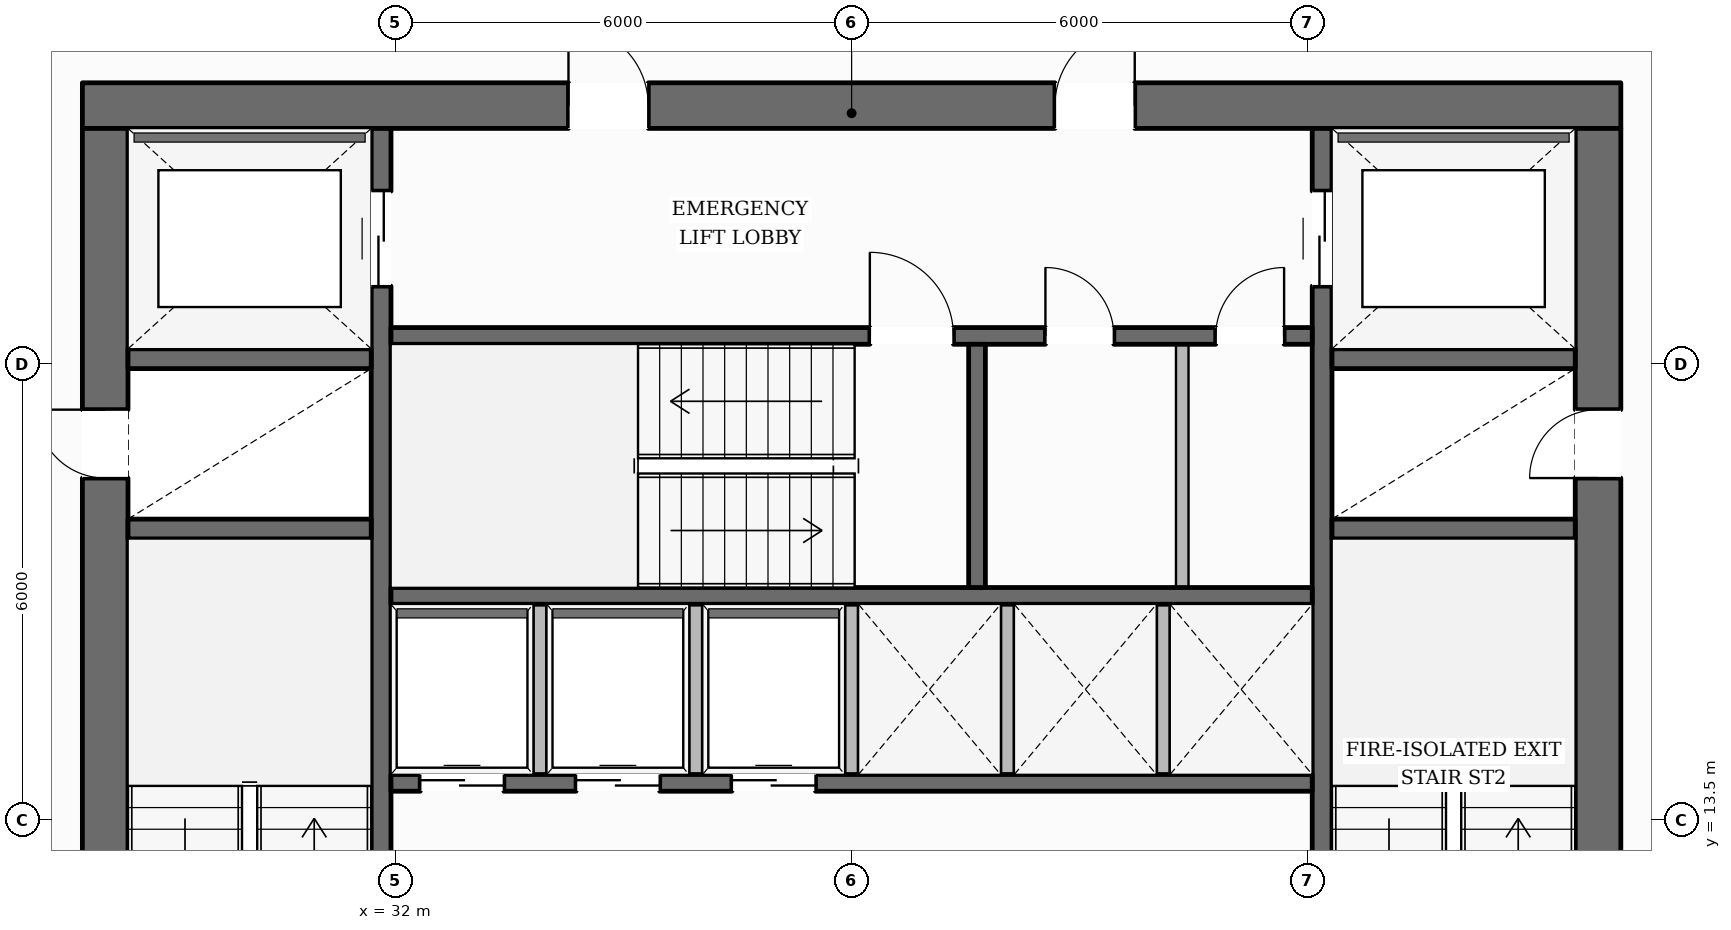
"""IFC4 building model, lengths in metres.
Left out: names, types, materials, properties, quantities, classifications, styles, units other than length and angle.
Written with IfcOpenShell. Run it as: python <this file> out.ifc"""

import sys

from ifc_helpers import new_model, si_unit, direction, frame, frame_2d, origin, place, context, subcontext, project, spatial, rectangle, extrude, element, fill, save


model = new_model("IFC4")
c1 = context("Model", 3, precision=1e-05, world=origin(), true_north=direction((0.0, 1.0)))
c2 = subcontext(c1, "Body", "Model", "MODEL_VIEW")
j1 = project(units=[si_unit("LENGTHUNIT", "METRE"), si_unit("PLANEANGLEUNIT", "RADIAN")], contexts=[c1])
p1 = place(None, origin())
s1 = spatial("IfcSite", under=j1, at=p1, CompositionType="ELEMENT")
p2 = place(p1, origin())
s2 = spatial("IfcBuilding", under=s1, at=p2, CompositionType="ELEMENT")
p3 = place(p2, frame((0.0, 0.0, 32.95)))
s3 = spatial("IfcBuildingStorey", under=s2, at=p3, CompositionType="ELEMENT", Elevation=32.95)
p4 = place(p3, frame((27.88, 22.9, 0.0), z_axis=(0.0, 0.0, 1.0), x_axis=(1.0, 0.0, 0.0)))
e1 = element("IfcWall", 1, at=p4, inside=s3, PredefinedType="SOLIDWALL", context=c2, shape_type="SweptSolid", body=[
    extrude(rectangle(XDim=20.24, YDim=0.6, at=frame_2d((10.12, 0.0))), origin(), (0.0, 0.0, 1.0), 3.59),
])
p5 = place(p4, frame((6.395, 0.0, 0.0)))
e2 = element("IfcOpeningElement", 2, at=p5, cuts=e1, PredefinedType="OPENING", context=c2, shape_type="SweptSolid", body=[
    extrude(rectangle(XDim=1.05, YDim=2.15, at=frame_2d((0.525, 1.075))), frame((0.0, 0.31, 0.0), z_axis=(0.0, -1.0, 0.0), x_axis=(1.0, 0.0, 0.0)), (0.0, 0.0, 1.0), 0.62),
])
p6 = place(p4, frame((12.795, 0.0, 0.0)))
e3 = element("IfcOpeningElement", 3, at=p6, cuts=e1, PredefinedType="OPENING", context=c2, shape_type="SweptSolid", body=[
    extrude(rectangle(XDim=1.05, YDim=2.15, at=frame_2d((0.525, 1.075))), frame((0.0, 0.31, 0.0), z_axis=(0.0, -1.0, 0.0), x_axis=(1.0, 0.0, 0.0)), (0.0, 0.0, 1.0), 0.62),
])
p7 = place(p3, frame((28.18, 9.6, 0.0), z_axis=(0.0, 0.0, 1.0), x_axis=(0.0, 1.0, 0.0)))
e4 = element("IfcWall", 4, at=p7, inside=s3, PredefinedType="SOLIDWALL", context=c2, shape_type="SweptSolid", body=[
    extrude(rectangle(XDim=13.0, YDim=0.6, at=frame_2d((6.5, 0.0))), origin(), (0.0, 0.0, 1.0), 3.59),
])
p8 = place(p7, frame((0.2, 0.0, 0.0)))
e5 = element("IfcOpeningElement", 5, at=p8, cuts=e4, PredefinedType="OPENING", context=c2, shape_type="SweptSolid", body=[
    extrude(rectangle(XDim=1.1, YDim=2.15, at=frame_2d((0.55, 1.075))), frame((0.0, 0.31, 0.0), z_axis=(0.0, -1.0, 0.0), x_axis=(1.0, 0.0, 0.0)), (0.0, 0.0, 1.0), 0.62),
])
p9 = place(p7, frame((8.4, 0.0, 0.0)))
e6 = element("IfcOpeningElement", 6, at=p9, cuts=e4, PredefinedType="OPENING", context=c2, shape_type="SweptSolid", body=[
    extrude(rectangle(XDim=0.9, YDim=2.1, at=frame_2d((0.45, 1.05))), frame((0.0, 0.31, 0.0), z_axis=(0.0, -1.0, 0.0), x_axis=(1.0, 0.0, 0.0)), (0.0, 0.0, 1.0), 0.62),
])
p10 = place(p3, frame((47.82, 9.6, 0.0), z_axis=(0.0, 0.0, 1.0), x_axis=(0.0, 1.0, 0.0)))
e7 = element("IfcWall", 7, at=p10, inside=s3, PredefinedType="SOLIDWALL", context=c2, shape_type="SweptSolid", body=[
    extrude(rectangle(XDim=13.0, YDim=0.6, at=frame_2d((6.5, 0.0))), origin(), (0.0, 0.0, 1.0), 3.59),
])
p11 = place(p10, frame((0.2, 0.0, 0.0)))
e8 = element("IfcOpeningElement", 8, at=p11, cuts=e7, PredefinedType="OPENING", context=c2, shape_type="SweptSolid", body=[
    extrude(rectangle(XDim=1.1, YDim=2.15, at=frame_2d((0.55, 1.075))), frame((0.0, 0.31, 0.0), z_axis=(0.0, -1.0, 0.0), x_axis=(1.0, 0.0, 0.0)), (0.0, 0.0, 1.0), 0.62),
])
p12 = place(p10, frame((8.4, 0.0, 0.0)))
e9 = element("IfcOpeningElement", 9, at=p12, cuts=e7, PredefinedType="OPENING", context=c2, shape_type="SweptSolid", body=[
    extrude(rectangle(XDim=0.9, YDim=2.1, at=frame_2d((0.45, 1.05))), frame((0.0, 0.31, 0.0), z_axis=(0.0, -1.0, 0.0), x_axis=(1.0, 0.0, 0.0)), (0.0, 0.0, 1.0), 0.62),
])
p13 = place(p3, frame((31.81, 9.6, 0.0), z_axis=(0.0, 0.0, 1.0), x_axis=(0.0, 1.0, 0.0)))
e10 = element("IfcWall", 10, at=p13, inside=s3, PredefinedType="SHEAR", context=c2, shape_type="SweptSolid", body=[
    extrude(rectangle(XDim=13.0, YDim=0.26, at=frame_2d((6.5, 0.0))), origin(), (0.0, 0.0, 1.0), 3.59),
])
p14 = place(p13, frame((10.925, 0.0, 0.0)))
e11 = element("IfcOpeningElement", 11, at=p14, cuts=e10, PredefinedType="OPENING", context=c2, shape_type="SweptSolid", body=[
    extrude(rectangle(XDim=1.25, YDim=2.25, at=frame_2d((0.625, 1.125))), frame((0.0, 0.14, 0.0), z_axis=(0.0, -1.0, 0.0), x_axis=(1.0, 0.0, 0.0)), (0.0, 0.0, 1.0), 0.28),
])
p15 = place(p3, frame((44.19, 9.6, 0.0), z_axis=(0.0, 0.0, 1.0), x_axis=(0.0, 1.0, 0.0)))
e12 = element("IfcWall", 12, at=p15, inside=s3, PredefinedType="SHEAR", context=c2, shape_type="SweptSolid", body=[
    extrude(rectangle(XDim=13.0, YDim=0.26, at=frame_2d((6.5, 0.0))), origin(), (0.0, 0.0, 1.0), 3.59),
])
p16 = place(p15, frame((10.925, 0.0, 0.0)))
e13 = element("IfcOpeningElement", 13, at=p16, cuts=e12, PredefinedType="OPENING", context=c2, shape_type="SweptSolid", body=[
    extrude(rectangle(XDim=1.25, YDim=2.25, at=frame_2d((0.625, 1.125))), frame((0.0, 0.14, 0.0), z_axis=(0.0, -1.0, 0.0), x_axis=(1.0, 0.0, 0.0)), (0.0, 0.0, 1.0), 0.28),
])
for number, where, z_axis, x_axis in (
    (14, (28.48, 17.33, 0.0), (0.0, 0.0, 1.0), (1.0, 0.0, 0.0)),
    (15, (28.48, 19.57, 0.0), (0.0, 0.0, 1.0), (1.0, 0.0, 0.0)),
    (16, (44.32, 17.33, 0.0), (0.0, 0.0, 1.0), (1.0, 0.0, 0.0)),
    (17, (44.32, 19.57, 0.0), (0.0, 0.0, 1.0), (1.0, 0.0, 0.0)),
):
    element("IfcWall", number, at=place(p3, frame(where, z_axis=z_axis, x_axis=x_axis)), inside=s3, PredefinedType="SHEAR", context=c2, shape_type="SweptSolid", body=[
        extrude(rectangle(XDim=3.2, YDim=0.26, at=frame_2d((1.6, 0.0))), origin(), (0.0, 0.0, 1.0), 3.59),
    ])
p17 = place(p3, frame((31.94, 19.87, 0.0), z_axis=(0.0, 0.0, 1.0), x_axis=(1.0, 0.0, 0.0)))
e18 = element("IfcWall", 18, at=p17, inside=s3, PredefinedType="SOLIDWALL", context=c2, shape_type="SweptSolid", body=[
    extrude(rectangle(XDim=12.12, YDim=0.22, at=frame_2d((6.06, 0.0))), origin(), (0.0, 0.0, 1.0), 3.59),
])
p18 = place(p17, frame((6.3, 0.0, 0.0)))
e19 = element("IfcOpeningElement", 19, at=p18, cuts=e18, PredefinedType="OPENING", context=c2, shape_type="SweptSolid", body=[
    extrude(rectangle(XDim=1.1, YDim=2.15, at=frame_2d((0.55, 1.075))), frame((0.0, 0.12, 0.0), z_axis=(0.0, -1.0, 0.0), x_axis=(1.0, 0.0, 0.0)), (0.0, 0.0, 1.0), 0.24),
])
p19 = place(p17, frame((8.61, 0.0, 0.0)))
e20 = element("IfcOpeningElement", 20, at=p19, cuts=e18, PredefinedType="OPENING", context=c2, shape_type="SweptSolid", body=[
    extrude(rectangle(XDim=0.9, YDim=2.1, at=frame_2d((0.45, 1.05))), frame((0.0, 0.12, 0.0), z_axis=(0.0, -1.0, 0.0), x_axis=(1.0, 0.0, 0.0)), (0.0, 0.0, 1.0), 0.24),
])
p20 = place(p17, frame((10.85, 0.0, 0.0)))
e21 = element("IfcOpeningElement", 21, at=p20, cuts=e18, PredefinedType="OPENING", context=c2, shape_type="SweptSolid", body=[
    extrude(rectangle(XDim=0.9, YDim=2.1, at=frame_2d((0.45, 1.05))), frame((0.0, 0.12, 0.0), z_axis=(0.0, -1.0, 0.0), x_axis=(1.0, 0.0, 0.0)), (0.0, 0.0, 1.0), 0.24),
])
p21 = place(p3, frame((31.94, 16.45, 0.0), z_axis=(0.0, 0.0, 1.0), x_axis=(1.0, 0.0, 0.0)))
e22 = element("IfcWall", 22, at=p21, inside=s3, PredefinedType="SOLIDWALL", context=c2, shape_type="SweptSolid", body=[
    extrude(rectangle(XDim=12.12, YDim=0.22, at=frame_2d((6.06, 0.0))), origin(), (0.0, 0.0, 1.0), 3.59),
])
p22 = place(p3, frame((39.65, 16.56, 0.0), z_axis=(0.0, 0.0, 1.0), x_axis=(0.0, 1.0, 0.0)))
e23 = element("IfcWall", 23, at=p22, inside=s3, PredefinedType="SOLIDWALL", context=c2, shape_type="SweptSolid", body=[
    extrude(rectangle(XDim=3.2, YDim=0.22, at=frame_2d((1.6, 0.0))), origin(), (0.0, 0.0, 1.0), 3.59),
])
p23 = place(p3, frame((31.94, 13.99, 0.0), z_axis=(0.0, 0.0, 1.0), x_axis=(1.0, 0.0, 0.0)))
e24 = element("IfcWall", 24, at=p23, inside=s3, PredefinedType="SOLIDWALL", context=c2, shape_type="SweptSolid", body=[
    extrude(rectangle(XDim=12.12, YDim=0.22, at=frame_2d((6.06, 0.0))), origin(), (0.0, 0.0, 1.0), 3.59),
])
p24 = place(p23, frame((0.385, 0.0, 0.0)))
e25 = element("IfcOpeningElement", 25, at=p24, cuts=e24, PredefinedType="OPENING", context=c2, shape_type="SweptSolid", body=[
    extrude(rectangle(XDim=1.1, YDim=2.2, at=frame_2d((0.55, 1.1))), frame((0.0, 0.12, 0.0), z_axis=(0.0, -1.0, 0.0), x_axis=(1.0, 0.0, 0.0)), (0.0, 0.0, 1.0), 0.24),
])
p25 = place(p23, frame((2.435, 0.0, 0.0)))
e26 = element("IfcOpeningElement", 26, at=p25, cuts=e24, PredefinedType="OPENING", context=c2, shape_type="SweptSolid", body=[
    extrude(rectangle(XDim=1.1, YDim=2.2, at=frame_2d((0.55, 1.1))), frame((0.0, 0.12, 0.0), z_axis=(0.0, -1.0, 0.0), x_axis=(1.0, 0.0, 0.0)), (0.0, 0.0, 1.0), 0.24),
])
p26 = place(p23, frame((4.485, 0.0, 0.0)))
e27 = element("IfcOpeningElement", 27, at=p26, cuts=e24, PredefinedType="OPENING", context=c2, shape_type="SweptSolid", body=[
    extrude(rectangle(XDim=1.1, YDim=2.2, at=frame_2d((0.55, 1.1))), frame((0.0, 0.12, 0.0), z_axis=(0.0, -1.0, 0.0), x_axis=(1.0, 0.0, 0.0)), (0.0, 0.0, 1.0), 0.24),
])
p27 = place(p3, frame((13.32, 14.856, 0.0), z_axis=(0.0, 0.0, 1.0), x_axis=(0.495031565758, 0.868874990378, 0.0)))
e28 = element("IfcWall", 28, at=p27, inside=s3, PredefinedType="STANDARD", context=c2, shape_type="SweptSolid", body=[
    extrude(rectangle(XDim=34.25, YDim=0.38, at=frame_2d((17.125, 0.0))), origin(), (0.0, 0.0, 1.0), 2.97),
])
p28 = place(p27, frame((25.087, 0.0, 0.0)))
e29 = element("IfcOpeningElement", 29, at=p28, cuts=e28, PredefinedType="OPENING", context=c2, shape_type="SweptSolid", body=[
    extrude(rectangle(XDim=1.0, YDim=2.2, at=frame_2d((0.5, 1.1))), frame((0.0, 0.2, 0.0), z_axis=(0.0, -1.0, 0.0), x_axis=(1.0, 0.0, 0.0)), (0.0, 0.0, 1.0), 0.4),
])
p29 = place(p27, frame((30.17, 0.0, 0.65)))
e30 = element("IfcOpeningElement", 30, at=p29, cuts=e28, PredefinedType="OPENING", context=c2, shape_type="SweptSolid", body=[
    extrude(rectangle(XDim=1.65, YDim=1.75, at=frame_2d((0.825, 0.875))), frame((0.0, 0.2, 0.0), z_axis=(0.0, -1.0, 0.0), x_axis=(1.0, 0.0, 0.0)), (0.0, 0.0, 1.0), 0.4),
])
p30 = place(p27, frame((7.973, 0.0, 0.65)))
e31 = element("IfcOpeningElement", 31, at=p30, cuts=e28, PredefinedType="OPENING", context=c2, shape_type="SweptSolid", body=[
    extrude(rectangle(XDim=1.65, YDim=1.75, at=frame_2d((0.825, 0.875))), frame((0.0, 0.2, 0.0), z_axis=(0.0, -1.0, 0.0), x_axis=(1.0, 0.0, 0.0)), (0.0, 0.0, 1.0), 0.4),
])
p31 = place(p27, frame((2.424, 0.0, 0.65)))
e32 = element("IfcOpeningElement", 32, at=p31, cuts=e28, PredefinedType="OPENING", context=c2, shape_type="SweptSolid", body=[
    extrude(rectangle(XDim=1.65, YDim=1.75, at=frame_2d((0.825, 0.875))), frame((0.0, 0.2, 0.0), z_axis=(0.0, -1.0, 0.0), x_axis=(1.0, 0.0, 0.0)), (0.0, 0.0, 1.0), 0.4),
])
p32 = place(p3, frame((45.788, 44.579, 0.0), z_axis=(0.0, 0.0, 1.0), x_axis=(0.49695855075, -0.867774278736, 0.0)))
e33 = element("IfcWall", 33, at=p32, inside=s3, PredefinedType="STANDARD", context=c2, shape_type="SweptSolid", body=[
    extrude(rectangle(XDim=34.379, YDim=0.38, at=frame_2d((17.189, 0.0))), origin(), (0.0, 0.0, 1.0), 2.97),
])
p33 = place(p32, frame((25.184, 0.0, 0.0)))
e34 = element("IfcOpeningElement", 34, at=p33, cuts=e33, PredefinedType="OPENING", context=c2, shape_type="SweptSolid", body=[
    extrude(rectangle(XDim=1.0, YDim=2.2, at=frame_2d((0.5, 1.1))), frame((0.0, 0.2, 0.0), z_axis=(0.0, -1.0, 0.0), x_axis=(1.0, 0.0, 0.0)), (0.0, 0.0, 1.0), 0.4),
])
p34 = place(p32, frame((30.294, 0.0, 0.65)))
e35 = element("IfcOpeningElement", 35, at=p34, cuts=e33, PredefinedType="OPENING", context=c2, shape_type="SweptSolid", body=[
    extrude(rectangle(XDim=1.65, YDim=1.75, at=frame_2d((0.825, 0.875))), frame((0.0, 0.2, 0.0), z_axis=(0.0, -1.0, 0.0), x_axis=(1.0, 0.0, 0.0)), (0.0, 0.0, 1.0), 0.4),
])
p35 = place(p32, frame((19.152, 0.0, 0.65)))
e36 = element("IfcOpeningElement", 36, at=p35, cuts=e33, PredefinedType="OPENING", context=c2, shape_type="SweptSolid", body=[
    extrude(rectangle(XDim=1.65, YDim=1.75, at=frame_2d((0.825, 0.875))), frame((0.0, 0.2, 0.0), z_axis=(0.0, -1.0, 0.0), x_axis=(1.0, 0.0, 0.0)), (0.0, 0.0, 1.0), 0.4),
])
p36 = place(p32, frame((8.01, 0.0, 0.65)))
e37 = element("IfcOpeningElement", 37, at=p36, cuts=e33, PredefinedType="OPENING", context=c2, shape_type="SweptSolid", body=[
    extrude(rectangle(XDim=1.65, YDim=1.75, at=frame_2d((0.825, 0.875))), frame((0.0, 0.2, 0.0), z_axis=(0.0, -1.0, 0.0), x_axis=(1.0, 0.0, 0.0)), (0.0, 0.0, 1.0), 0.4),
])
p37 = place(p32, frame((2.438, 0.0, 0.65)))
e38 = element("IfcOpeningElement", 38, at=p37, cuts=e33, PredefinedType="OPENING", context=c2, shape_type="SweptSolid", body=[
    extrude(rectangle(XDim=1.65, YDim=1.75, at=frame_2d((0.825, 0.875))), frame((0.0, 0.2, 0.0), z_axis=(0.0, -1.0, 0.0), x_axis=(1.0, 0.0, 0.0)), (0.0, 0.0, 1.0), 0.4),
])
for number, where, z_axis, x_axis in (
    (39, (33.9, 14.1, 0.0), (0.0, 0.0, 1.0), (0.0, 1.0, 0.0)),
    (40, (35.95, 14.1, 0.0), (0.0, 0.0, 1.0), (0.0, 1.0, 0.0)),
    (41, (38.0, 14.1, 0.0), (0.0, 0.0, 1.0), (0.0, 1.0, 0.0)),
    (42, (40.05, 14.1, 0.0), (0.0, 0.0, 1.0), (0.0, 1.0, 0.0)),
    (43, (42.1, 14.1, 0.0), (0.0, 0.0, 1.0), (0.0, 1.0, 0.0)),
):
    element("IfcWall", number, at=place(p3, frame(where, z_axis=z_axis, x_axis=x_axis)), inside=s3, PredefinedType="PARTITIONING", context=c2, shape_type="SweptSolid", body=[
        extrude(rectangle(XDim=2.24, YDim=0.165, at=frame_2d((1.12, 0.0))), origin(), (0.0, 0.0, 1.0), 3.59),
    ])
p38 = place(p3, frame((42.35, 16.56, 0.0), z_axis=(0.0, 0.0, 1.0), x_axis=(0.0, 1.0, 0.0)))
e44 = element("IfcWall", 44, at=p38, inside=s3, PredefinedType="PARTITIONING", context=c2, shape_type="SweptSolid", body=[
    extrude(rectangle(XDim=3.2, YDim=0.165, at=frame_2d((1.6, 0.0))), origin(), (0.0, 0.0, 1.0), 3.59),
])
p39 = place(p18, origin())
e45 = element("IfcDoor", 45, at=p39, inside=s3, OperationType="SINGLE_SWING_LEFT", PredefinedType="DOOR", context=c2, shape_type="SweptSolid", body=[
    extrude(rectangle(XDim=1.1, YDim=2.15, at=frame_2d((0.55, 1.075))), frame((0.0, 0.025, 0.0), z_axis=(0.0, -1.0, 0.0), x_axis=(1.0, 0.0, 0.0)), (0.0, 0.0, 1.0), 0.05),
])
fill(e19, e45)
p40 = place(p9, origin())
e46 = element("IfcDoor", 46, at=p40, inside=s3, OperationType="SINGLE_SWING_RIGHT", PredefinedType="DOOR", context=c2, shape_type="SweptSolid", body=[
    extrude(rectangle(XDim=0.9, YDim=2.1, at=frame_2d((0.45, 1.05))), frame((0.0, 0.025, 0.0), z_axis=(0.0, -1.0, 0.0), x_axis=(1.0, 0.0, 0.0)), (0.0, 0.0, 1.0), 0.05),
])
fill(e6, e46)
p41 = place(p12, origin())
e47 = element("IfcDoor", 47, at=p41, inside=s3, OperationType="SINGLE_SWING_LEFT", PredefinedType="DOOR", context=c2, shape_type="SweptSolid", body=[
    extrude(rectangle(XDim=0.9, YDim=2.1, at=frame_2d((0.45, 1.05))), frame((0.0, 0.025, 0.0), z_axis=(0.0, -1.0, 0.0), x_axis=(1.0, 0.0, 0.0)), (0.0, 0.0, 1.0), 0.05),
])
fill(e9, e47)
p42 = place(p5, origin())
e48 = element("IfcDoor", 48, at=p42, inside=s3, OperationType="SINGLE_SWING_LEFT", PredefinedType="DOOR", context=c2, shape_type="SweptSolid", body=[
    extrude(rectangle(XDim=1.05, YDim=2.15, at=frame_2d((0.525, 1.075))), frame((0.0, 0.025, 0.0), z_axis=(0.0, -1.0, 0.0), x_axis=(1.0, 0.0, 0.0)), (0.0, 0.0, 1.0), 0.05),
])
fill(e2, e48)
p43 = place(p6, origin())
e49 = element("IfcDoor", 49, at=p43, inside=s3, OperationType="SINGLE_SWING_RIGHT", PredefinedType="DOOR", context=c2, shape_type="SweptSolid", body=[
    extrude(rectangle(XDim=1.05, YDim=2.15, at=frame_2d((0.525, 1.075))), frame((0.0, 0.025, 0.0), z_axis=(0.0, -1.0, 0.0), x_axis=(1.0, 0.0, 0.0)), (0.0, 0.0, 1.0), 0.05),
])
fill(e3, e49)
p44 = place(p14, origin())
e50 = element("IfcDoor", 50, at=p44, inside=s3, OperationType="DOUBLE_DOOR_SLIDING", PredefinedType="DOOR", context=c2, shape_type="SweptSolid", body=[
    extrude(rectangle(XDim=1.25, YDim=2.25, at=frame_2d((0.625, 1.125))), frame((0.0, 0.025, 0.0), z_axis=(0.0, -1.0, 0.0), x_axis=(1.0, 0.0, 0.0)), (0.0, 0.0, 1.0), 0.05),
])
fill(e11, e50)
p45 = place(p16, origin())
e51 = element("IfcDoor", 51, at=p45, inside=s3, OperationType="DOUBLE_DOOR_SLIDING", PredefinedType="DOOR", context=c2, shape_type="SweptSolid", body=[
    extrude(rectangle(XDim=1.25, YDim=2.25, at=frame_2d((0.625, 1.125))), frame((0.0, 0.025, 0.0), z_axis=(0.0, -1.0, 0.0), x_axis=(1.0, 0.0, 0.0)), (0.0, 0.0, 1.0), 0.05),
])
fill(e13, e51)
p46 = place(p24, origin())
e52 = element("IfcDoor", 52, at=p46, inside=s3, OperationType="DOUBLE_DOOR_SLIDING", PredefinedType="DOOR", context=c2, shape_type="SweptSolid", body=[
    extrude(rectangle(XDim=1.1, YDim=2.2, at=frame_2d((0.55, 1.1))), frame((0.0, 0.025, 0.0), z_axis=(0.0, -1.0, 0.0), x_axis=(1.0, 0.0, 0.0)), (0.0, 0.0, 1.0), 0.05),
])
fill(e25, e52)
p47 = place(p25, origin())
e53 = element("IfcDoor", 53, at=p47, inside=s3, OperationType="DOUBLE_DOOR_SLIDING", PredefinedType="DOOR", context=c2, shape_type="SweptSolid", body=[
    extrude(rectangle(XDim=1.1, YDim=2.2, at=frame_2d((0.55, 1.1))), frame((0.0, 0.025, 0.0), z_axis=(0.0, -1.0, 0.0), x_axis=(1.0, 0.0, 0.0)), (0.0, 0.0, 1.0), 0.05),
])
fill(e26, e53)
p48 = place(p26, origin())
e54 = element("IfcDoor", 54, at=p48, inside=s3, OperationType="DOUBLE_DOOR_SLIDING", PredefinedType="DOOR", context=c2, shape_type="SweptSolid", body=[
    extrude(rectangle(XDim=1.1, YDim=2.2, at=frame_2d((0.55, 1.1))), frame((0.0, 0.025, 0.0), z_axis=(0.0, -1.0, 0.0), x_axis=(1.0, 0.0, 0.0)), (0.0, 0.0, 1.0), 0.05),
])
fill(e27, e54)
p49 = place(p19, origin())
e55 = element("IfcDoor", 55, at=p49, inside=s3, OperationType="SINGLE_SWING_LEFT", PredefinedType="DOOR", context=c2, shape_type="SweptSolid", body=[
    extrude(rectangle(XDim=0.9, YDim=2.1, at=frame_2d((0.45, 1.05))), frame((0.0, 0.025, 0.0), z_axis=(0.0, -1.0, 0.0), x_axis=(1.0, 0.0, 0.0)), (0.0, 0.0, 1.0), 0.05),
])
fill(e20, e55)
p50 = place(p20, origin())
e56 = element("IfcDoor", 56, at=p50, inside=s3, OperationType="SINGLE_SWING_RIGHT", PredefinedType="DOOR", context=c2, shape_type="SweptSolid", body=[
    extrude(rectangle(XDim=0.9, YDim=2.1, at=frame_2d((0.45, 1.05))), frame((0.0, 0.025, 0.0), z_axis=(0.0, -1.0, 0.0), x_axis=(1.0, 0.0, 0.0)), (0.0, 0.0, 1.0), 0.05),
])
fill(e21, e56)
save(model, sys.argv[1])
